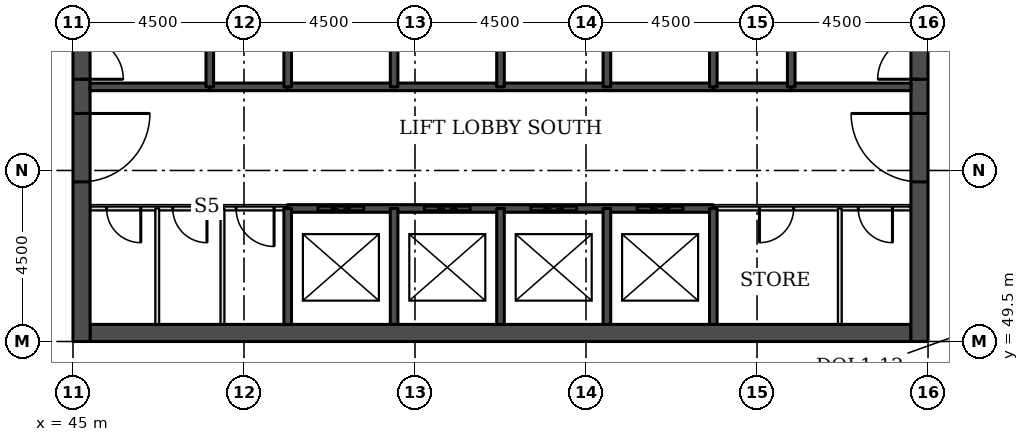
"""IFC4 building model, lengths in metres.
Left out: names, types, materials, properties, quantities, classifications, styles, units other than length and angle.
Written with IfcOpenShell. Run it as: python <this file> out.ifc"""

import sys

from ifc_helpers import new_model, si_unit, direction, frame, frame_2d, origin, place, context, subcontext, project, spatial, rectangle, extrude, element, fill, save


model = new_model("IFC4")
c1 = context("Model", 3, precision=1e-05, world=origin(), true_north=direction((0.0, 1.0)))
c2 = subcontext(c1, "Body", "Model", "MODEL_VIEW")
j1 = project(units=[si_unit("LENGTHUNIT", "METRE"), si_unit("PLANEANGLEUNIT", "RADIAN")], contexts=[c1])
p1 = place(None, origin())
s1 = spatial("IfcSite", under=j1, at=p1, CompositionType="ELEMENT")
p2 = place(p1, origin())
s2 = spatial("IfcBuilding", under=s1, at=p2, CompositionType="ELEMENT")
p3 = place(p2, frame((0.0, 0.0, 82.6)))
s3 = spatial("IfcBuildingStorey", under=s2, at=p3, CompositionType="ELEMENT", Elevation=82.6)
p4 = place(p3, frame((45.45, 49.725, 0.0), z_axis=(0.0, 0.0, 1.0), x_axis=(1.0, 0.0, 0.0)))
e1 = element("IfcWall", 1, at=p4, inside=s3, PredefinedType="SHEAR", context=c2, shape_type="SweptSolid", body=[
    extrude(rectangle(XDim=21.6, YDim=0.45, at=frame_2d((10.8, 0.0))), origin(), (0.0, 0.0, 1.0), 3.7),
])
p5 = place(p3, frame((45.225, 49.5, 0.0), z_axis=(0.0, 0.0, 1.0), x_axis=(0.0, 1.0, 0.0)))
e2 = element("IfcWall", 2, at=p5, inside=s3, PredefinedType="SHEAR", context=c2, shape_type="SweptSolid", body=[
    extrude(rectangle(XDim=22.5, YDim=0.45, at=frame_2d((11.25, 0.0))), origin(), (0.0, 0.0, 1.0), 3.7),
])
p6 = place(p5, frame((4.2, 0.0, 0.0)))
e3 = element("IfcOpeningElement", 3, at=p6, cuts=e2, PredefinedType="OPENING", context=c2, shape_type="SweptSolid", body=[
    extrude(rectangle(XDim=1.8, YDim=2.1, at=frame_2d((0.9, 1.05))), frame((0.0, 0.235, 0.0), z_axis=(0.0, -1.0, 0.0), x_axis=(1.0, 0.0, 0.0)), (0.0, 0.0, 1.0), 0.47),
])
p7 = place(p5, frame((6.9, 0.0, 0.0)))
e4 = element("IfcOpeningElement", 4, at=p7, cuts=e2, PredefinedType="OPENING", context=c2, shape_type="SweptSolid", body=[
    extrude(rectangle(XDim=1.1, YDim=2.1, at=frame_2d((0.55, 1.05))), frame((0.0, 0.235, 0.0), z_axis=(0.0, -1.0, 0.0), x_axis=(1.0, 0.0, 0.0)), (0.0, 0.0, 1.0), 0.47),
])
p8 = place(p5, frame((13.6, 0.0, 0.0)))
e5 = element("IfcOpeningElement", 5, at=p8, cuts=e2, PredefinedType="OPENING", context=c2, shape_type="SweptSolid", body=[
    extrude(rectangle(XDim=1.1, YDim=2.1, at=frame_2d((0.55, 1.05))), frame((0.0, 0.235, 0.0), z_axis=(0.0, -1.0, 0.0), x_axis=(1.0, 0.0, 0.0)), (0.0, 0.0, 1.0), 0.47),
])
p9 = place(p5, frame((16.5, 0.0, 0.0)))
e6 = element("IfcOpeningElement", 6, at=p9, cuts=e2, PredefinedType="OPENING", context=c2, shape_type="SweptSolid", body=[
    extrude(rectangle(XDim=1.8, YDim=2.1, at=frame_2d((0.9, 1.05))), frame((0.0, 0.235, 0.0), z_axis=(0.0, -1.0, 0.0), x_axis=(1.0, 0.0, 0.0)), (0.0, 0.0, 1.0), 0.47),
])
p10 = place(p3, frame((67.275, 49.5, 0.0), z_axis=(0.0, 0.0, 1.0), x_axis=(0.0, 1.0, 0.0)))
e7 = element("IfcWall", 7, at=p10, inside=s3, PredefinedType="SHEAR", context=c2, shape_type="SweptSolid", body=[
    extrude(rectangle(XDim=22.5, YDim=0.45, at=frame_2d((11.25, 0.0))), origin(), (0.0, 0.0, 1.0), 3.7),
])
p11 = place(p10, frame((4.2, 0.0, 0.0)))
e8 = element("IfcOpeningElement", 8, at=p11, cuts=e7, PredefinedType="OPENING", context=c2, shape_type="SweptSolid", body=[
    extrude(rectangle(XDim=1.8, YDim=2.1, at=frame_2d((0.9, 1.05))), frame((0.0, 0.235, 0.0), z_axis=(0.0, -1.0, 0.0), x_axis=(1.0, 0.0, 0.0)), (0.0, 0.0, 1.0), 0.47),
])
p12 = place(p10, frame((6.9, 0.0, 0.0)))
e9 = element("IfcOpeningElement", 9, at=p12, cuts=e7, PredefinedType="OPENING", context=c2, shape_type="SweptSolid", body=[
    extrude(rectangle(XDim=1.1, YDim=2.1, at=frame_2d((0.55, 1.05))), frame((0.0, 0.235, 0.0), z_axis=(0.0, -1.0, 0.0), x_axis=(1.0, 0.0, 0.0)), (0.0, 0.0, 1.0), 0.47),
])
p13 = place(p10, frame((13.6, 0.0, 0.0)))
e10 = element("IfcOpeningElement", 10, at=p13, cuts=e7, PredefinedType="OPENING", context=c2, shape_type="SweptSolid", body=[
    extrude(rectangle(XDim=1.1, YDim=2.1, at=frame_2d((0.55, 1.05))), frame((0.0, 0.235, 0.0), z_axis=(0.0, -1.0, 0.0), x_axis=(1.0, 0.0, 0.0)), (0.0, 0.0, 1.0), 0.47),
])
p14 = place(p10, frame((16.5, 0.0, 0.0)))
e11 = element("IfcOpeningElement", 11, at=p14, cuts=e7, PredefinedType="OPENING", context=c2, shape_type="SweptSolid", body=[
    extrude(rectangle(XDim=1.8, YDim=2.1, at=frame_2d((0.9, 1.05))), frame((0.0, 0.235, 0.0), z_axis=(0.0, -1.0, 0.0), x_axis=(1.0, 0.0, 0.0)), (0.0, 0.0, 1.0), 0.47),
])
p15 = place(p3, frame((45.45, 53.0, 0.0), z_axis=(0.0, 0.0, 1.0), x_axis=(1.0, 0.0, 0.0)))
e12 = element("IfcWall", 12, at=p15, inside=s3, PredefinedType="PARTITIONING", context=c2, shape_type="SweptSolid", body=[
    extrude(rectangle(XDim=5.2, YDim=0.1, at=frame_2d((2.6, 0.0))), origin(), (0.0, 0.0, 1.0), 3.55),
])
p16 = place(p15, frame((0.434, 0.0, 0.0)))
e13 = element("IfcOpeningElement", 13, at=p16, cuts=e12, PredefinedType="OPENING", context=c2, shape_type="SweptSolid", body=[
    extrude(rectangle(XDim=0.9, YDim=2.1, at=frame_2d((0.45, 1.05))), frame((0.0, 0.06, 0.0), z_axis=(0.0, -1.0, 0.0), x_axis=(1.0, 0.0, 0.0)), (0.0, 0.0, 1.0), 0.12),
])
p17 = place(p15, frame((2.176, 0.0, 0.0)))
e14 = element("IfcOpeningElement", 14, at=p17, cuts=e12, PredefinedType="OPENING", context=c2, shape_type="SweptSolid", body=[
    extrude(rectangle(XDim=0.9, YDim=2.1, at=frame_2d((0.45, 1.05))), frame((0.0, 0.06, 0.0), z_axis=(0.0, -1.0, 0.0), x_axis=(1.0, 0.0, 0.0)), (0.0, 0.0, 1.0), 0.12),
])
p18 = place(p15, frame((3.842, 0.0, 0.0)))
e15 = element("IfcOpeningElement", 15, at=p18, cuts=e12, PredefinedType="OPENING", context=c2, shape_type="SweptSolid", body=[
    extrude(rectangle(XDim=1.0, YDim=2.1, at=frame_2d((0.5, 1.05))), frame((0.0, 0.06, 0.0), z_axis=(0.0, -1.0, 0.0), x_axis=(1.0, 0.0, 0.0)), (0.0, 0.0, 1.0), 0.12),
])
p19 = place(p3, frame((61.85, 53.0, 0.0), z_axis=(0.0, 0.0, 1.0), x_axis=(1.0, 0.0, 0.0)))
e16 = element("IfcWall", 16, at=p19, inside=s3, PredefinedType="PARTITIONING", context=c2, shape_type="SweptSolid", body=[
    extrude(rectangle(XDim=5.2, YDim=0.1, at=frame_2d((2.6, 0.0))), origin(), (0.0, 0.0, 1.0), 3.55),
])
p20 = place(p19, frame((3.814, 0.0, 0.0)))
e17 = element("IfcOpeningElement", 17, at=p20, cuts=e16, PredefinedType="OPENING", context=c2, shape_type="SweptSolid", body=[
    extrude(rectangle(XDim=0.9, YDim=2.1, at=frame_2d((0.45, 1.05))), frame((0.0, 0.06, 0.0), z_axis=(0.0, -1.0, 0.0), x_axis=(1.0, 0.0, 0.0)), (0.0, 0.0, 1.0), 0.12),
])
p21 = place(p19, frame((1.214, 0.0, 0.0)))
e18 = element("IfcOpeningElement", 18, at=p21, cuts=e16, PredefinedType="OPENING", context=c2, shape_type="SweptSolid", body=[
    extrude(rectangle(XDim=0.9, YDim=2.1, at=frame_2d((0.45, 1.05))), frame((0.0, 0.06, 0.0), z_axis=(0.0, -1.0, 0.0), x_axis=(1.0, 0.0, 0.0)), (0.0, 0.0, 1.0), 0.12),
])
p22 = place(p3, frame((50.65, 53.0, 0.0), z_axis=(0.0, 0.0, 1.0), x_axis=(1.0, 0.0, 0.0)))
e19 = element("IfcWall", 19, at=p22, inside=s3, PredefinedType="SOLIDWALL", context=c2, shape_type="SweptSolid", body=[
    extrude(rectangle(XDim=11.2, YDim=0.2, at=frame_2d((5.6, 0.0))), origin(), (0.0, 0.0, 1.0), 3.55),
])
p23 = place(p22, frame((0.8, 0.0, 0.0)))
e20 = element("IfcOpeningElement", 20, at=p23, cuts=e19, PredefinedType="OPENING", context=c2, shape_type="SweptSolid", body=[
    extrude(rectangle(XDim=1.2, YDim=2.1, at=frame_2d((0.6, 1.05))), frame((0.0, 0.11, 0.0), z_axis=(0.0, -1.0, 0.0), x_axis=(1.0, 0.0, 0.0)), (0.0, 0.0, 1.0), 0.22),
])
p24 = place(p22, frame((3.6, 0.0, 0.0)))
e21 = element("IfcOpeningElement", 21, at=p24, cuts=e19, PredefinedType="OPENING", context=c2, shape_type="SweptSolid", body=[
    extrude(rectangle(XDim=1.2, YDim=2.1, at=frame_2d((0.6, 1.05))), frame((0.0, 0.11, 0.0), z_axis=(0.0, -1.0, 0.0), x_axis=(1.0, 0.0, 0.0)), (0.0, 0.0, 1.0), 0.22),
])
p25 = place(p22, frame((6.4, 0.0, 0.0)))
e22 = element("IfcOpeningElement", 22, at=p25, cuts=e19, PredefinedType="OPENING", context=c2, shape_type="SweptSolid", body=[
    extrude(rectangle(XDim=1.2, YDim=2.1, at=frame_2d((0.6, 1.05))), frame((0.0, 0.11, 0.0), z_axis=(0.0, -1.0, 0.0), x_axis=(1.0, 0.0, 0.0)), (0.0, 0.0, 1.0), 0.22),
])
p26 = place(p22, frame((9.2, 0.0, 0.0)))
e23 = element("IfcOpeningElement", 23, at=p26, cuts=e19, PredefinedType="OPENING", context=c2, shape_type="SweptSolid", body=[
    extrude(rectangle(XDim=1.2, YDim=2.1, at=frame_2d((0.6, 1.05))), frame((0.0, 0.11, 0.0), z_axis=(0.0, -1.0, 0.0), x_axis=(1.0, 0.0, 0.0)), (0.0, 0.0, 1.0), 0.22),
])
for number, where, z_axis, x_axis in (
    (24, (48.6, 56.2, 0.0), (0.0, 0.0, 1.0), (1.0, 0.0, 0.0)),
    (25, (61.85, 56.2, 0.0), (0.0, 0.0, 1.0), (1.0, 0.0, 0.0)),
):
    element("IfcWall", number, at=place(p3, frame(where, z_axis=z_axis, x_axis=x_axis)), inside=s3, PredefinedType="SOLIDWALL", context=c2, shape_type="SweptSolid", body=[
        extrude(rectangle(XDim=2.05, YDim=0.2, at=frame_2d((1.025, 0.0))), origin(), (0.0, 0.0, 1.0), 3.55),
    ])
p27 = place(p3, frame((45.45, 56.2, 0.0), z_axis=(0.0, 0.0, 1.0), x_axis=(1.0, 0.0, 0.0)))
e26 = element("IfcWall", 26, at=p27, inside=s3, PredefinedType="SOLIDWALL", context=c2, shape_type="SweptSolid", body=[
    extrude(rectangle(XDim=3.15, YDim=0.2, at=frame_2d((1.575, 0.0))), origin(), (0.0, 0.0, 1.0), 3.55),
])
p28 = place(p3, frame((50.65, 56.2, 0.0), z_axis=(0.0, 0.0, 1.0), x_axis=(1.0, 0.0, 0.0)))
e27 = element("IfcWall", 27, at=p28, inside=s3, PredefinedType="SOLIDWALL", context=c2, shape_type="SweptSolid", body=[
    extrude(rectangle(XDim=11.2, YDim=0.2, at=frame_2d((5.6, 0.0))), origin(), (0.0, 0.0, 1.0), 3.55),
])
p29 = place(p3, frame((63.9, 56.2, 0.0), z_axis=(0.0, 0.0, 1.0), x_axis=(1.0, 0.0, 0.0)))
e28 = element("IfcWall", 28, at=p29, inside=s3, PredefinedType="SOLIDWALL", context=c2, shape_type="SweptSolid", body=[
    extrude(rectangle(XDim=3.15, YDim=0.2, at=frame_2d((1.575, 0.0))), origin(), (0.0, 0.0, 1.0), 3.55),
])
p30 = place(p3, frame((47.218, 49.95, 0.0), z_axis=(0.0, 0.0, 1.0), x_axis=(0.0, 1.0, 0.0)))
e29 = element("IfcWall", 29, at=p30, inside=s3, PredefinedType="PARTITIONING", context=c2, shape_type="SweptSolid", body=[
    extrude(rectangle(XDim=3.05, YDim=0.1, at=frame_2d((1.525, 0.0))), origin(), (0.0, 0.0, 1.0), 3.55),
])
p31 = place(p3, frame((48.6, 56.2, 0.0), z_axis=(0.0, 0.0, 1.0), x_axis=(0.0, 1.0, 0.0)))
e30 = element("IfcWall", 30, at=p31, inside=s3, PredefinedType="SOLIDWALL", context=c2, shape_type="SweptSolid", body=[
    extrude(rectangle(XDim=5.8, YDim=0.2, at=frame_2d((2.9, 0.0))), origin(), (0.0, 0.0, 1.0), 3.55),
])
p32 = place(p3, frame((48.934, 49.95, 0.0), z_axis=(0.0, 0.0, 1.0), x_axis=(0.0, 1.0, 0.0)))
e31 = element("IfcWall", 31, at=p32, inside=s3, PredefinedType="PARTITIONING", context=c2, shape_type="SweptSolid", body=[
    extrude(rectangle(XDim=3.05, YDim=0.1, at=frame_2d((1.525, 0.0))), origin(), (0.0, 0.0, 1.0), 3.55),
])
p33 = place(p3, frame((50.65, 49.95, 0.0), z_axis=(0.0, 0.0, 1.0), x_axis=(0.0, 1.0, 0.0)))
e32 = element("IfcWall", 32, at=p33, inside=s3, PredefinedType="SOLIDWALL", context=c2, shape_type="SweptSolid", body=[
    extrude(rectangle(XDim=3.05, YDim=0.2, at=frame_2d((1.525, 0.0))), origin(), (0.0, 0.0, 1.0), 3.55),
])
p34 = place(p3, frame((50.65, 56.2, 0.0), z_axis=(0.0, 0.0, 1.0), x_axis=(0.0, 1.0, 0.0)))
e33 = element("IfcWall", 33, at=p34, inside=s3, PredefinedType="SOLIDWALL", context=c2, shape_type="SweptSolid", body=[
    extrude(rectangle(XDim=2.8, YDim=0.2, at=frame_2d((1.4, 0.0))), origin(), (0.0, 0.0, 1.0), 3.55),
])
p35 = place(p3, frame((53.45, 49.95, 0.0), z_axis=(0.0, 0.0, 1.0), x_axis=(0.0, 1.0, 0.0)))
e34 = element("IfcWall", 34, at=p35, inside=s3, PredefinedType="SOLIDWALL", context=c2, shape_type="SweptSolid", body=[
    extrude(rectangle(XDim=3.05, YDim=0.2, at=frame_2d((1.525, 0.0))), origin(), (0.0, 0.0, 1.0), 3.55),
])
p36 = place(p3, frame((53.45, 56.2, 0.0), z_axis=(0.0, 0.0, 1.0), x_axis=(0.0, 1.0, 0.0)))
e35 = element("IfcWall", 35, at=p36, inside=s3, PredefinedType="SOLIDWALL", context=c2, shape_type="SweptSolid", body=[
    extrude(rectangle(XDim=2.8, YDim=0.2, at=frame_2d((1.4, 0.0))), origin(), (0.0, 0.0, 1.0), 3.55),
])
p37 = place(p3, frame((56.25, 49.95, 0.0), z_axis=(0.0, 0.0, 1.0), x_axis=(0.0, 1.0, 0.0)))
e36 = element("IfcWall", 36, at=p37, inside=s3, PredefinedType="SOLIDWALL", context=c2, shape_type="SweptSolid", body=[
    extrude(rectangle(XDim=3.05, YDim=0.2, at=frame_2d((1.525, 0.0))), origin(), (0.0, 0.0, 1.0), 3.55),
])
p38 = place(p3, frame((56.25, 56.2, 0.0), z_axis=(0.0, 0.0, 1.0), x_axis=(0.0, 1.0, 0.0)))
e37 = element("IfcWall", 37, at=p38, inside=s3, PredefinedType="SOLIDWALL", context=c2, shape_type="SweptSolid", body=[
    extrude(rectangle(XDim=2.8, YDim=0.2, at=frame_2d((1.4, 0.0))), origin(), (0.0, 0.0, 1.0), 3.55),
])
p39 = place(p3, frame((59.05, 49.95, 0.0), z_axis=(0.0, 0.0, 1.0), x_axis=(0.0, 1.0, 0.0)))
e38 = element("IfcWall", 38, at=p39, inside=s3, PredefinedType="SOLIDWALL", context=c2, shape_type="SweptSolid", body=[
    extrude(rectangle(XDim=3.05, YDim=0.2, at=frame_2d((1.525, 0.0))), origin(), (0.0, 0.0, 1.0), 3.55),
])
p40 = place(p3, frame((59.05, 56.2, 0.0), z_axis=(0.0, 0.0, 1.0), x_axis=(0.0, 1.0, 0.0)))
e39 = element("IfcWall", 39, at=p40, inside=s3, PredefinedType="SOLIDWALL", context=c2, shape_type="SweptSolid", body=[
    extrude(rectangle(XDim=2.8, YDim=0.2, at=frame_2d((1.4, 0.0))), origin(), (0.0, 0.0, 1.0), 3.55),
])
p41 = place(p3, frame((61.85, 49.95, 0.0), z_axis=(0.0, 0.0, 1.0), x_axis=(0.0, 1.0, 0.0)))
e40 = element("IfcWall", 40, at=p41, inside=s3, PredefinedType="SOLIDWALL", context=c2, shape_type="SweptSolid", body=[
    extrude(rectangle(XDim=3.05, YDim=0.2, at=frame_2d((1.525, 0.0))), origin(), (0.0, 0.0, 1.0), 3.55),
])
p42 = place(p3, frame((61.85, 56.2, 0.0), z_axis=(0.0, 0.0, 1.0), x_axis=(0.0, 1.0, 0.0)))
e41 = element("IfcWall", 41, at=p42, inside=s3, PredefinedType="SOLIDWALL", context=c2, shape_type="SweptSolid", body=[
    extrude(rectangle(XDim=2.8, YDim=0.2, at=frame_2d((1.4, 0.0))), origin(), (0.0, 0.0, 1.0), 3.55),
])
p43 = place(p3, frame((63.9, 56.2, 0.0), z_axis=(0.0, 0.0, 1.0), x_axis=(0.0, 1.0, 0.0)))
e42 = element("IfcWall", 42, at=p43, inside=s3, PredefinedType="SOLIDWALL", context=c2, shape_type="SweptSolid", body=[
    extrude(rectangle(XDim=5.8, YDim=0.2, at=frame_2d((2.9, 0.0))), origin(), (0.0, 0.0, 1.0), 3.55),
])
p44 = place(p3, frame((65.178, 49.95, 0.0), z_axis=(0.0, 0.0, 1.0), x_axis=(0.0, 1.0, 0.0)))
e43 = element("IfcWall", 43, at=p44, inside=s3, PredefinedType="PARTITIONING", context=c2, shape_type="SweptSolid", body=[
    extrude(rectangle(XDim=3.05, YDim=0.1, at=frame_2d((1.525, 0.0))), origin(), (0.0, 0.0, 1.0), 3.55),
])
p45 = place(p23, origin())
e44 = element("IfcDoor", 44, at=p45, inside=s3, OperationType="DOUBLE_DOOR_SLIDING", PredefinedType="DOOR", context=c2, shape_type="SweptSolid", body=[
    extrude(rectangle(XDim=1.2, YDim=2.1, at=frame_2d((0.6, 1.05))), frame((0.0, 0.025, 0.0), z_axis=(0.0, -1.0, 0.0), x_axis=(1.0, 0.0, 0.0)), (0.0, 0.0, 1.0), 0.05),
])
fill(e20, e44)
p46 = place(p24, origin())
e45 = element("IfcDoor", 45, at=p46, inside=s3, OperationType="DOUBLE_DOOR_SLIDING", PredefinedType="DOOR", context=c2, shape_type="SweptSolid", body=[
    extrude(rectangle(XDim=1.2, YDim=2.1, at=frame_2d((0.6, 1.05))), frame((0.0, 0.025, 0.0), z_axis=(0.0, -1.0, 0.0), x_axis=(1.0, 0.0, 0.0)), (0.0, 0.0, 1.0), 0.05),
])
fill(e21, e45)
p47 = place(p25, origin())
e46 = element("IfcDoor", 46, at=p47, inside=s3, OperationType="DOUBLE_DOOR_SLIDING", PredefinedType="DOOR", context=c2, shape_type="SweptSolid", body=[
    extrude(rectangle(XDim=1.2, YDim=2.1, at=frame_2d((0.6, 1.05))), frame((0.0, 0.025, 0.0), z_axis=(0.0, -1.0, 0.0), x_axis=(1.0, 0.0, 0.0)), (0.0, 0.0, 1.0), 0.05),
])
fill(e22, e46)
p48 = place(p26, origin())
e47 = element("IfcDoor", 47, at=p48, inside=s3, OperationType="DOUBLE_DOOR_SLIDING", PredefinedType="DOOR", context=c2, shape_type="SweptSolid", body=[
    extrude(rectangle(XDim=1.2, YDim=2.1, at=frame_2d((0.6, 1.05))), frame((0.0, 0.025, 0.0), z_axis=(0.0, -1.0, 0.0), x_axis=(1.0, 0.0, 0.0)), (0.0, 0.0, 1.0), 0.05),
])
fill(e23, e47)
p49 = place(p6, frame((1.8, 0.0, 0.0), z_axis=(0.0, 0.0, 1.0), x_axis=(-1.0, 0.0, 0.0)))
e48 = element("IfcDoor", 48, at=p49, inside=s3, OperationType="SINGLE_SWING_LEFT", PredefinedType="DOOR", context=c2, shape_type="SweptSolid", body=[
    extrude(rectangle(XDim=1.8, YDim=2.1, at=frame_2d((0.9, 1.05))), frame((0.0, 0.025, 0.0), z_axis=(0.0, -1.0, 0.0), x_axis=(1.0, 0.0, 0.0)), (0.0, 0.0, 1.0), 0.05),
])
fill(e3, e48)
p50 = place(p7, frame((1.1, 0.0, 0.0), z_axis=(0.0, 0.0, 1.0), x_axis=(-1.0, 0.0, 0.0)))
e49 = element("IfcDoor", 49, at=p50, inside=s3, OperationType="SINGLE_SWING_RIGHT", PredefinedType="DOOR", context=c2, shape_type="SweptSolid", body=[
    extrude(rectangle(XDim=1.1, YDim=2.1, at=frame_2d((0.55, 1.05))), frame((0.0, 0.025, 0.0), z_axis=(0.0, -1.0, 0.0), x_axis=(1.0, 0.0, 0.0)), (0.0, 0.0, 1.0), 0.05),
])
fill(e4, e49)
p51 = place(p11, origin())
e50 = element("IfcDoor", 50, at=p51, inside=s3, OperationType="SINGLE_SWING_RIGHT", PredefinedType="DOOR", context=c2, shape_type="SweptSolid", body=[
    extrude(rectangle(XDim=1.8, YDim=2.1, at=frame_2d((0.9, 1.05))), frame((0.0, 0.025, 0.0), z_axis=(0.0, -1.0, 0.0), x_axis=(1.0, 0.0, 0.0)), (0.0, 0.0, 1.0), 0.05),
])
fill(e8, e50)
p52 = place(p12, origin())
e51 = element("IfcDoor", 51, at=p52, inside=s3, OperationType="SINGLE_SWING_LEFT", PredefinedType="DOOR", context=c2, shape_type="SweptSolid", body=[
    extrude(rectangle(XDim=1.1, YDim=2.1, at=frame_2d((0.55, 1.05))), frame((0.0, 0.025, 0.0), z_axis=(0.0, -1.0, 0.0), x_axis=(1.0, 0.0, 0.0)), (0.0, 0.0, 1.0), 0.05),
])
fill(e9, e51)
p53 = place(p20, frame((0.9, 0.0, 0.0), z_axis=(0.0, 0.0, 1.0), x_axis=(-1.0, 0.0, 0.0)))
e52 = element("IfcDoor", 52, at=p53, inside=s3, OperationType="SINGLE_SWING_LEFT", PredefinedType="DOOR", context=c2, shape_type="SweptSolid", body=[
    extrude(rectangle(XDim=0.9, YDim=2.1, at=frame_2d((0.45, 1.05))), frame((0.0, 0.025, 0.0), z_axis=(0.0, -1.0, 0.0), x_axis=(1.0, 0.0, 0.0)), (0.0, 0.0, 1.0), 0.05),
])
fill(e17, e52)
p54 = place(p21, frame((0.9, 0.0, 0.0), z_axis=(0.0, 0.0, 1.0), x_axis=(-1.0, 0.0, 0.0)))
e53 = element("IfcDoor", 53, at=p54, inside=s3, OperationType="SINGLE_SWING_RIGHT", PredefinedType="DOOR", context=c2, shape_type="SweptSolid", body=[
    extrude(rectangle(XDim=0.9, YDim=2.1, at=frame_2d((0.45, 1.05))), frame((0.0, 0.025, 0.0), z_axis=(0.0, -1.0, 0.0), x_axis=(1.0, 0.0, 0.0)), (0.0, 0.0, 1.0), 0.05),
])
fill(e18, e53)
p55 = place(p16, frame((0.9, 0.0, 0.0), z_axis=(0.0, 0.0, 1.0), x_axis=(-1.0, 0.0, 0.0)))
e54 = element("IfcDoor", 54, at=p55, inside=s3, OperationType="SINGLE_SWING_LEFT", PredefinedType="DOOR", context=c2, shape_type="SweptSolid", body=[
    extrude(rectangle(XDim=0.9, YDim=2.1, at=frame_2d((0.45, 1.05))), frame((0.0, 0.025, 0.0), z_axis=(0.0, -1.0, 0.0), x_axis=(1.0, 0.0, 0.0)), (0.0, 0.0, 1.0), 0.05),
])
fill(e13, e54)
p56 = place(p17, frame((0.9, 0.0, 0.0), z_axis=(0.0, 0.0, 1.0), x_axis=(-1.0, 0.0, 0.0)))
e55 = element("IfcDoor", 55, at=p56, inside=s3, OperationType="SINGLE_SWING_LEFT", PredefinedType="DOOR", context=c2, shape_type="SweptSolid", body=[
    extrude(rectangle(XDim=0.9, YDim=2.1, at=frame_2d((0.45, 1.05))), frame((0.0, 0.025, 0.0), z_axis=(0.0, -1.0, 0.0), x_axis=(1.0, 0.0, 0.0)), (0.0, 0.0, 1.0), 0.05),
])
fill(e14, e55)
p57 = place(p18, frame((1.0, 0.0, 0.0), z_axis=(0.0, 0.0, 1.0), x_axis=(-1.0, 0.0, 0.0)))
e56 = element("IfcDoor", 56, at=p57, inside=s3, OperationType="SINGLE_SWING_LEFT", PredefinedType="DOOR", context=c2, shape_type="SweptSolid", body=[
    extrude(rectangle(XDim=1.0, YDim=2.1, at=frame_2d((0.5, 1.05))), frame((0.0, 0.025, 0.0), z_axis=(0.0, -1.0, 0.0), x_axis=(1.0, 0.0, 0.0)), (0.0, 0.0, 1.0), 0.05),
])
fill(e15, e56)
save(model, sys.argv[1])
